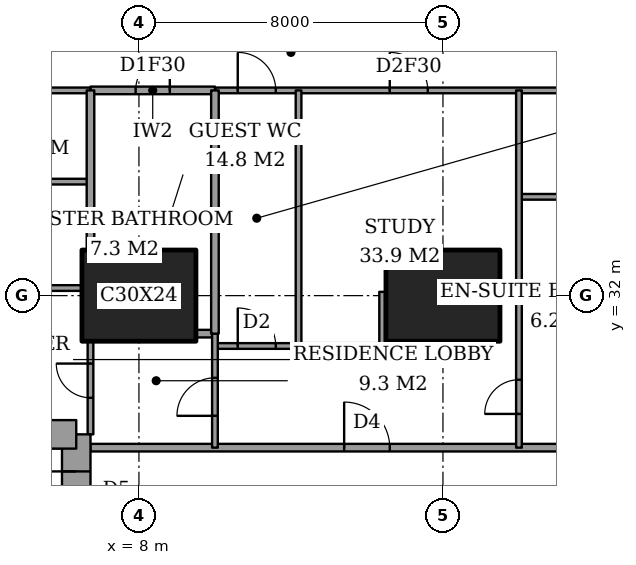
"""IFC4 building model, lengths in metres.
Left out: names, types, materials, properties, quantities, classifications, styles, units other than length and angle.
Written with IfcOpenShell. Run it as: python <this file> out.ifc"""

import sys

from ifc_helpers import new_model, si_unit, direction, frame, frame_2d, origin, origin_2d, place, context, subcontext, project, spatial, rectangle, extrude, element, fill, save


model = new_model("IFC4")
c1 = context("Model", 3, precision=1e-05, world=origin(), true_north=direction((0.0, 1.0)))
c2 = subcontext(c1, "Body", "Model", "MODEL_VIEW")
j1 = project(units=[si_unit("LENGTHUNIT", "METRE"), si_unit("PLANEANGLEUNIT", "RADIAN")], contexts=[c1])
p1 = place(None, origin())
s1 = spatial("IfcSite", under=j1, at=p1, CompositionType="ELEMENT")
p2 = place(p1, origin())
s2 = spatial("IfcBuilding", under=s1, at=p2, CompositionType="ELEMENT")
p3 = place(p2, frame((0.0, 0.0, 139.4)))
s3 = spatial("IfcBuildingStorey", under=s2, at=p3, CompositionType="ELEMENT", Elevation=139.4)
for number, where, z_axis, x_axis in (
    (1, (8.0, 32.0, 0.0), (0.0, 0.0, 1.0), (1.0, 0.0, 0.0)),
    (2, (16.0, 32.0, 0.0), (0.0, 0.0, 1.0), (1.0, 0.0, 0.0)),
):
    element("IfcColumn", number, at=place(p3, frame(where, z_axis=z_axis, x_axis=x_axis)), inside=s3, PredefinedType="COLUMN", context=c2, shape_type="SweptSolid", body=[
        extrude(rectangle(XDim=3.0, YDim=2.4, at=origin_2d()), origin(), (0.0, 0.0, 1.0), 3.6),
    ])
p4 = place(p3, frame((6.35, 19.65, 0.0), z_axis=(0.0, 0.0, 1.0), x_axis=(0.0, 1.0, 0.0)))
e3 = element("IfcWall", 3, at=p4, inside=s3, PredefinedType="SHEAR", context=c2, shape_type="SweptSolid", body=[
    extrude(rectangle(XDim=8.7, YDim=0.75, at=frame_2d((4.35, 0.0))), origin(), (0.0, 0.0, 1.0), 3.6),
])
p5 = place(p4, frame((6.725, 0.0, 0.0)))
e4 = element("IfcOpeningElement", 4, at=p5, cuts=e3, PredefinedType="OPENING", context=c2, shape_type="SweptSolid", body=[
    extrude(rectangle(XDim=1.0, YDim=2.1, at=frame_2d((0.5, 1.05))), frame((0.0, 0.385, 0.0), z_axis=(0.0, -1.0, 0.0), x_axis=(1.0, 0.0, 0.0)), (0.0, 0.0, 1.0), 0.77),
])
p6 = place(p3, frame((6.35, 28.35, 0.0), z_axis=(0.0, 0.0, 1.0), x_axis=(-1.0, 0.0, 0.0)))
e5 = element("IfcWall", 5, at=p6, inside=s3, PredefinedType="SHEAR", context=c2, shape_type="SweptSolid", body=[
    extrude(rectangle(XDim=4.45, YDim=0.75, at=frame_2d((2.225, 0.0))), origin(), (0.0, 0.0, 1.0), 3.6),
])
p7 = place(p3, frame((6.725, 28.0, 0.0), z_axis=(0.0, 0.0, 1.0), x_axis=(1.0, 0.0, 0.0)))
e6 = element("IfcWall", 6, at=p7, inside=s3, PredefinedType="PARTITIONING", context=c2, shape_type="SweptSolid", body=[
    extrude(rectangle(XDim=17.275, YDim=0.2, at=frame_2d((8.637, 0.0))), origin(), (0.0, 0.0, 1.0), 3.35),
])
p8 = place(p7, frame((6.675, 0.0, 0.0)))
e7 = element("IfcOpeningElement", 7, at=p8, cuts=e6, PredefinedType="OPENING", context=c2, shape_type="SweptSolid", body=[
    extrude(rectangle(XDim=1.2, YDim=2.4, at=frame_2d((0.6, 1.2))), frame((0.0, 0.11, 0.0), z_axis=(0.0, -1.0, 0.0), x_axis=(1.0, 0.0, 0.0)), (0.0, 0.0, 1.0), 0.22),
])
p9 = place(p3, frame((10.0, 30.675, 0.0), z_axis=(0.0, 0.0, 1.0), x_axis=(1.0, 0.0, 0.0)))
e8 = element("IfcWall", 8, at=p9, inside=s3, PredefinedType="PARTITIONING", context=c2, shape_type="SweptSolid", body=[
    extrude(rectangle(XDim=4.4, YDim=0.15, at=frame_2d((2.2, 0.0))), origin(), (0.0, 0.0, 1.0), 3.35),
])
p10 = place(p9, frame((0.6, 0.0, 0.0)))
e9 = element("IfcOpeningElement", 9, at=p10, cuts=e8, PredefinedType="OPENING", context=c2, shape_type="SweptSolid", body=[
    extrude(rectangle(XDim=1.0, YDim=2.1, at=frame_2d((0.5, 1.05))), frame((0.0, 0.085, 0.0), z_axis=(0.0, -1.0, 0.0), x_axis=(1.0, 0.0, 0.0)), (0.0, 0.0, 1.0), 0.17),
])
p11 = place(p3, frame((9.5, 31.0, 0.0), z_axis=(0.0, 0.0, 1.0), x_axis=(1.0, 0.0, 0.0)))
e10 = element("IfcWall", 10, at=p11, inside=s3, PredefinedType="PARTITIONING", context=c2, shape_type="SweptSolid", body=[
    extrude(rectangle(XDim=0.5, YDim=0.2, at=frame_2d((0.25, 0.0))), origin(), (0.0, 0.0, 1.0), 3.35),
])
p12 = place(p3, frame((18.0, 32.0, 0.0), z_axis=(0.0, 0.0, 1.0), x_axis=(1.0, 0.0, 0.0)))
e11 = element("IfcWall", 11, at=p12, inside=s3, PredefinedType="PARTITIONING", context=c2, shape_type="SweptSolid", body=[
    extrude(rectangle(XDim=6.0, YDim=0.15, at=frame_2d((3.0, 0.0))), origin(), (0.0, 0.0, 1.0), 2.634),
])
p13 = place(p3, frame((17.5, 32.1, 0.0), z_axis=(0.0, 0.0, 1.0), x_axis=(1.0, 0.0, 0.0)))
e12 = element("IfcWall", 12, at=p13, inside=s3, PredefinedType="PARTITIONING", context=c2, shape_type="SweptSolid", body=[
    extrude(rectangle(XDim=0.5, YDim=0.15, at=frame_2d((0.25, 0.0))), origin(), (0.0, 0.0, 1.0), 2.634),
])
p14 = place(p3, frame((1.35, 32.2, 0.0), z_axis=(0.0, 0.0, 1.0), x_axis=(1.0, 0.0, 0.0)))
e13 = element("IfcWall", 13, at=p14, inside=s3, PredefinedType="PARTITIONING", context=c2, shape_type="SweptSolid", body=[
    extrude(rectangle(XDim=5.15, YDim=0.15, at=frame_2d((2.575, 0.0))), origin(), (0.0, 0.0, 1.0), 3.35),
])
p15 = place(p3, frame((18.0, 34.6, 0.0), z_axis=(0.0, 0.0, 1.0), x_axis=(1.0, 0.0, 0.0)))
e14 = element("IfcWall", 14, at=p15, inside=s3, PredefinedType="PARTITIONING", context=c2, shape_type="SweptSolid", body=[
    extrude(rectangle(XDim=2.4, YDim=0.15, at=frame_2d((1.2, 0.0))), origin(), (0.0, 0.0, 1.0), 3.35),
])
p16 = place(p3, frame((4.125, 35.0, 0.0), z_axis=(0.0, 0.0, 1.0), x_axis=(1.0, 0.0, 0.0)))
e15 = element("IfcWall", 15, at=p16, inside=s3, PredefinedType="PARTITIONING", context=c2, shape_type="SweptSolid", body=[
    extrude(rectangle(XDim=2.6, YDim=0.15, at=frame_2d((1.3, 0.0))), origin(), (0.0, 0.0, 1.0), 3.35),
])
p17 = place(p3, frame((6.725, 37.4, 0.0), z_axis=(0.0, 0.0, 1.0), x_axis=(1.0, 0.0, 0.0)))
e16 = element("IfcWall", 16, at=p17, inside=s3, PredefinedType="PARTITIONING", context=c2, shape_type="SweptSolid", body=[
    extrude(rectangle(XDim=3.275, YDim=0.2, at=frame_2d((1.637, 0.0))), origin(), (0.0, 0.0, 1.0), 3.35),
])
p18 = place(p17, frame((1.188, 0.0, 0.0)))
e17 = element("IfcOpeningElement", 17, at=p18, cuts=e16, PredefinedType="OPENING", context=c2, shape_type="SweptSolid", body=[
    extrude(rectangle(XDim=0.9, YDim=2.1, at=frame_2d((0.45, 1.05))), frame((0.0, 0.11, 0.0), z_axis=(0.0, -1.0, 0.0), x_axis=(1.0, 0.0, 0.0)), (0.0, 0.0, 1.0), 0.22),
])
p19 = place(p3, frame((-0.45, 37.4, 0.0), z_axis=(0.0, 0.0, 1.0), x_axis=(1.0, 0.0, 0.0)))
e18 = element("IfcWall", 18, at=p19, inside=s3, PredefinedType="PARTITIONING", context=c2, shape_type="SweptSolid", body=[
    extrude(rectangle(XDim=7.175, YDim=0.15, at=frame_2d((3.587, 0.0))), origin(), (0.0, 0.0, 1.0), 3.35),
])
p20 = place(p19, frame((3.087, 0.0, 0.0)))
e19 = element("IfcOpeningElement", 19, at=p20, cuts=e18, PredefinedType="OPENING", context=c2, shape_type="SweptSolid", body=[
    extrude(rectangle(XDim=1.0, YDim=2.1, at=frame_2d((0.5, 1.05))), frame((0.0, 0.085, 0.0), z_axis=(0.0, -1.0, 0.0), x_axis=(1.0, 0.0, 0.0)), (0.0, 0.0, 1.0), 0.17),
])
p21 = place(p3, frame((10.0, 37.4, 0.0), z_axis=(0.0, 0.0, 1.0), x_axis=(1.0, 0.0, 0.0)))
e20 = element("IfcWall", 20, at=p21, inside=s3, PredefinedType="PARTITIONING", context=c2, shape_type="SweptSolid", body=[
    extrude(rectangle(XDim=14.561, YDim=0.15, at=frame_2d((7.281, 0.0))), origin(), (0.0, 0.0, 1.0), 3.35),
])
p22 = place(p21, frame((0.6, 0.0, 0.0)))
e21 = element("IfcOpeningElement", 21, at=p22, cuts=e20, PredefinedType="OPENING", context=c2, shape_type="SweptSolid", body=[
    extrude(rectangle(XDim=1.0, YDim=2.1, at=frame_2d((0.5, 1.05))), frame((0.0, 0.085, 0.0), z_axis=(0.0, -1.0, 0.0), x_axis=(1.0, 0.0, 0.0)), (0.0, 0.0, 1.0), 0.17),
])
p23 = place(p21, frame((4.6, 0.0, 0.0)))
e22 = element("IfcOpeningElement", 22, at=p23, cuts=e20, PredefinedType="OPENING", context=c2, shape_type="SweptSolid", body=[
    extrude(rectangle(XDim=1.0, YDim=2.1, at=frame_2d((0.5, 1.05))), frame((0.0, 0.085, 0.0), z_axis=(0.0, -1.0, 0.0), x_axis=(1.0, 0.0, 0.0)), (0.0, 0.0, 1.0), 0.17),
])
p24 = place(p21, frame((10.725, 0.0, 0.0)))
e23 = element("IfcOpeningElement", 23, at=p24, cuts=e20, PredefinedType="OPENING", context=c2, shape_type="SweptSolid", body=[
    extrude(rectangle(XDim=1.0, YDim=2.1, at=frame_2d((0.5, 1.05))), frame((0.0, 0.085, 0.0), z_axis=(0.0, -1.0, 0.0), x_axis=(1.0, 0.0, 0.0)), (0.0, 0.0, 1.0), 0.17),
])
p25 = place(p3, frame((6.725, 33.2, 0.0), z_axis=(0.0, 0.0, 1.0), x_axis=(0.0, 1.0, 0.0)))
e24 = element("IfcWall", 24, at=p25, inside=s3, PredefinedType="PARTITIONING", context=c2, shape_type="SweptSolid", body=[
    extrude(rectangle(XDim=4.2, YDim=0.2, at=frame_2d((2.1, 0.0))), origin(), (0.0, 0.0, 1.0), 3.35),
])
p26 = place(p3, frame((6.725, 28.35, 0.0), z_axis=(0.0, 0.0, 1.0), x_axis=(0.0, 1.0, 0.0)))
e25 = element("IfcWall", 25, at=p26, inside=s3, PredefinedType="PARTITIONING", context=c2, shape_type="SweptSolid", body=[
    extrude(rectangle(XDim=2.45, YDim=0.15, at=frame_2d((1.225, 0.0))), origin(), (0.0, 0.0, 1.0), 3.35),
])
p27 = place(p26, frame((0.962, 0.0, 0.0)))
e26 = element("IfcOpeningElement", 26, at=p27, cuts=e25, PredefinedType="OPENING", context=c2, shape_type="SweptSolid", body=[
    extrude(rectangle(XDim=0.9, YDim=2.1, at=frame_2d((0.45, 1.05))), frame((0.0, 0.085, 0.0), z_axis=(0.0, -1.0, 0.0), x_axis=(1.0, 0.0, 0.0)), (0.0, 0.0, 1.0), 0.17),
])
p28 = place(p3, frame((10.0, 31.0, 0.0), z_axis=(0.0, 0.0, 1.0), x_axis=(0.0, 1.0, 0.0)))
e27 = element("IfcWall", 27, at=p28, inside=s3, PredefinedType="PARTITIONING", context=c2, shape_type="SweptSolid", body=[
    extrude(rectangle(XDim=6.4, YDim=0.2, at=frame_2d((3.2, 0.0))), origin(), (0.0, 0.0, 1.0), 3.35),
])
p29 = place(p3, frame((10.0, 28.0, 0.0), z_axis=(0.0, 0.0, 1.0), x_axis=(0.0, 1.0, 0.0)))
e28 = element("IfcWall", 28, at=p29, inside=s3, PredefinedType="PARTITIONING", context=c2, shape_type="SweptSolid", body=[
    extrude(rectangle(XDim=3.0, YDim=0.15, at=frame_2d((1.5, 0.0))), origin(), (0.0, 0.0, 1.0), 3.35),
])
p30 = place(p29, frame((0.837, 0.0, 0.0)))
e29 = element("IfcOpeningElement", 29, at=p30, cuts=e28, PredefinedType="OPENING", context=c2, shape_type="SweptSolid", body=[
    extrude(rectangle(XDim=1.0, YDim=2.1, at=frame_2d((0.5, 1.05))), frame((0.0, 0.085, 0.0), z_axis=(0.0, -1.0, 0.0), x_axis=(1.0, 0.0, 0.0)), (0.0, 0.0, 1.0), 0.17),
])
p31 = place(p3, frame((12.2, 30.675, 0.0), z_axis=(0.0, 0.0, 1.0), x_axis=(0.0, 1.0, 0.0)))
e30 = element("IfcWall", 30, at=p31, inside=s3, PredefinedType="PARTITIONING", context=c2, shape_type="SweptSolid", body=[
    extrude(rectangle(XDim=6.725, YDim=0.15, at=frame_2d((3.362, 0.0))), origin(), (0.0, 0.0, 1.0), 3.35),
])
p32 = place(p3, frame((14.4, 30.675, 0.0), z_axis=(0.0, 0.0, 1.0), x_axis=(0.0, 1.0, 0.0)))
e31 = element("IfcWall", 31, at=p32, inside=s3, PredefinedType="PARTITIONING", context=c2, shape_type="SweptSolid", body=[
    extrude(rectangle(XDim=1.425, YDim=0.15, at=frame_2d((0.712, 0.0))), origin(), (0.0, 0.0, 1.0), 3.35),
])
p33 = place(p3, frame((18.0, 28.0, 0.0), z_axis=(0.0, 0.0, 1.0), x_axis=(0.0, 1.0, 0.0)))
e32 = element("IfcWall", 32, at=p33, inside=s3, PredefinedType="PARTITIONING", context=c2, shape_type="SweptSolid", body=[
    extrude(rectangle(XDim=9.4, YDim=0.15, at=frame_2d((4.7, 0.0))), origin(), (0.0, 0.0, 1.0), 3.35),
])
p34 = place(p33, frame((0.887, 0.0, 0.0)))
e33 = element("IfcOpeningElement", 33, at=p34, cuts=e32, PredefinedType="OPENING", context=c2, shape_type="SweptSolid", body=[
    extrude(rectangle(XDim=0.9, YDim=2.1, at=frame_2d((0.45, 1.05))), frame((0.0, 0.085, 0.0), z_axis=(0.0, -1.0, 0.0), x_axis=(1.0, 0.0, 0.0)), (0.0, 0.0, 1.0), 0.17),
])
p35 = place(p22, origin())
e34 = element("IfcDoor", 34, at=p35, inside=s3, OperationType="SINGLE_SWING_RIGHT", PredefinedType="DOOR", context=c2, shape_type="SweptSolid", body=[
    extrude(rectangle(XDim=1.0, YDim=2.1, at=frame_2d((0.5, 1.05))), frame((0.0, 0.025, 0.0), z_axis=(0.0, -1.0, 0.0), x_axis=(1.0, 0.0, 0.0)), (0.0, 0.0, 1.0), 0.05),
])
fill(e21, e34)
p36 = place(p27, origin())
e35 = element("IfcDoor", 35, at=p36, inside=s3, OperationType="SINGLE_SWING_LEFT", PredefinedType="DOOR", context=c2, shape_type="SweptSolid", body=[
    extrude(rectangle(XDim=0.9, YDim=2.1, at=frame_2d((0.45, 1.05))), frame((0.0, 0.025, 0.0), z_axis=(0.0, -1.0, 0.0), x_axis=(1.0, 0.0, 0.0)), (0.0, 0.0, 1.0), 0.05),
])
fill(e26, e35)
p37 = place(p18, origin())
e36 = element("IfcDoor", 36, at=p37, inside=s3, OperationType="SINGLE_SWING_LEFT", PredefinedType="DOOR", context=c2, shape_type="SweptSolid", body=[
    extrude(rectangle(XDim=0.9, YDim=2.1, at=frame_2d((0.45, 1.05))), frame((0.0, 0.025, 0.0), z_axis=(0.0, -1.0, 0.0), x_axis=(1.0, 0.0, 0.0)), (0.0, 0.0, 1.0), 0.05),
])
fill(e17, e36)
p38 = place(p30, origin())
e37 = element("IfcDoor", 37, at=p38, inside=s3, OperationType="SINGLE_SWING_RIGHT", PredefinedType="DOOR", context=c2, shape_type="SweptSolid", body=[
    extrude(rectangle(XDim=1.0, YDim=2.1, at=frame_2d((0.5, 1.05))), frame((0.0, 0.025, 0.0), z_axis=(0.0, -1.0, 0.0), x_axis=(1.0, 0.0, 0.0)), (0.0, 0.0, 1.0), 0.05),
])
fill(e29, e37)
p39 = place(p8, origin())
e38 = element("IfcDoor", 38, at=p39, inside=s3, OperationType="SINGLE_SWING_RIGHT", PredefinedType="DOOR", context=c2, shape_type="SweptSolid", body=[
    extrude(rectangle(XDim=1.2, YDim=2.4, at=frame_2d((0.6, 1.2))), frame((0.0, 0.025, 0.0), z_axis=(0.0, -1.0, 0.0), x_axis=(1.0, 0.0, 0.0)), (0.0, 0.0, 1.0), 0.05),
])
fill(e7, e38)
p40 = place(p10, origin())
e39 = element("IfcDoor", 39, at=p40, inside=s3, OperationType="SINGLE_SWING_RIGHT", PredefinedType="DOOR", context=c2, shape_type="SweptSolid", body=[
    extrude(rectangle(XDim=1.0, YDim=2.1, at=frame_2d((0.5, 1.05))), frame((0.0, 0.025, 0.0), z_axis=(0.0, -1.0, 0.0), x_axis=(1.0, 0.0, 0.0)), (0.0, 0.0, 1.0), 0.05),
])
fill(e9, e39)
p41 = place(p23, origin())
e40 = element("IfcDoor", 40, at=p41, inside=s3, OperationType="SINGLE_SWING_RIGHT", PredefinedType="DOOR", context=c2, shape_type="SweptSolid", body=[
    extrude(rectangle(XDim=1.0, YDim=2.1, at=frame_2d((0.5, 1.05))), frame((0.0, 0.025, 0.0), z_axis=(0.0, -1.0, 0.0), x_axis=(1.0, 0.0, 0.0)), (0.0, 0.0, 1.0), 0.05),
])
fill(e22, e40)
p42 = place(p34, origin())
e41 = element("IfcDoor", 41, at=p42, inside=s3, OperationType="SINGLE_SWING_RIGHT", PredefinedType="DOOR", context=c2, shape_type="SweptSolid", body=[
    extrude(rectangle(XDim=0.9, YDim=2.1, at=frame_2d((0.45, 1.05))), frame((0.0, 0.025, 0.0), z_axis=(0.0, -1.0, 0.0), x_axis=(1.0, 0.0, 0.0)), (0.0, 0.0, 1.0), 0.05),
])
fill(e33, e41)
p43 = place(p5, origin())
e42 = element("IfcDoor", 42, at=p43, inside=s3, OperationType="SINGLE_SWING_LEFT", PredefinedType="DOOR", context=c2, shape_type="SweptSolid", body=[
    extrude(rectangle(XDim=1.0, YDim=2.1, at=frame_2d((0.5, 1.05))), frame((0.0, 0.025, 0.0), z_axis=(0.0, -1.0, 0.0), x_axis=(1.0, 0.0, 0.0)), (0.0, 0.0, 1.0), 0.05),
])
fill(e4, e42)
save(model, sys.argv[1])
